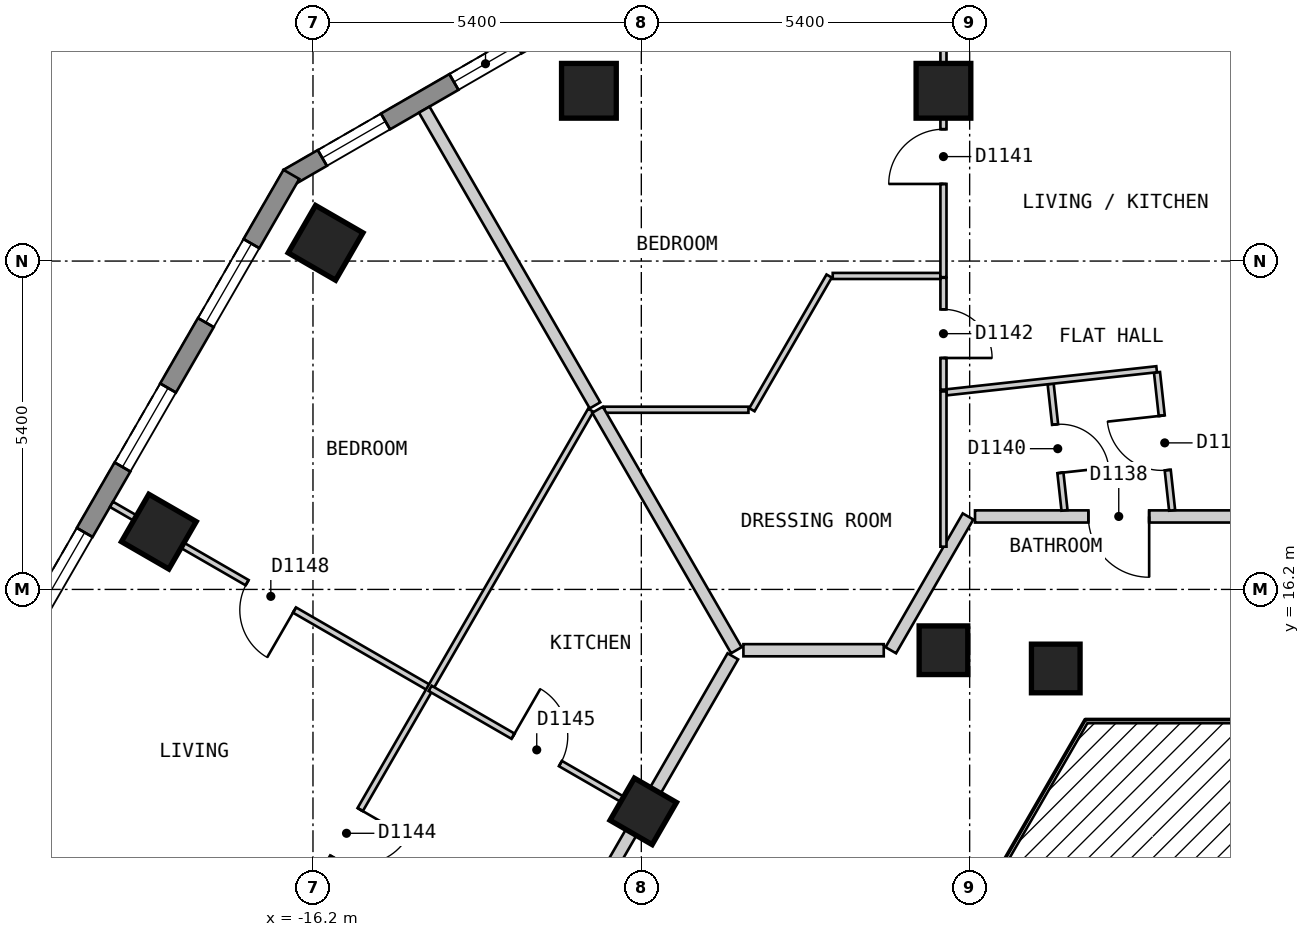
"""IFC4 building model, lengths in metres.
Left out: names, types, materials, properties, quantities, classifications, styles, units other than length and angle.
Written with IfcOpenShell. Run it as: python <this file> out.ifc"""

import sys

from ifc_helpers import new_model, si_unit, direction, frame, frame_2d, origin, origin_2d, place, context, subcontext, project, spatial, polyline, rectangle, outline, extrude, element, fill, save


model = new_model("IFC4")
c1 = context("Model", 3, precision=1e-05, world=origin(), true_north=direction((0.0, 1.0)))
c2 = subcontext(c1, "Body", "Model", "MODEL_VIEW")
j1 = project(units=[si_unit("LENGTHUNIT", "METRE"), si_unit("PLANEANGLEUNIT", "RADIAN")], contexts=[c1])
p1 = place(None, origin())
s1 = spatial("IfcSite", under=j1, at=p1, CompositionType="ELEMENT")
p2 = place(p1, origin())
s2 = spatial("IfcBuilding", under=s1, at=p2, CompositionType="ELEMENT")
p3 = place(p2, frame((0.0, 0.0, 150.6)))
s3 = spatial("IfcBuildingStorey", under=s2, at=p3, CompositionType="ELEMENT", Elevation=150.6)
for number, where, z_axis, x_axis in (
    (1, (-5.831, 24.4, 0.0), (0.0, 0.0, 1.0), (-1.0, 0.0, 0.0)),
    (2, (-11.662, 24.4, 0.0), (0.0, 0.0, 1.0), (-1.0, 0.0, 0.0)),
    (3, (-15.993, 21.9, 0.0), (0.0, 0.0, 1.0), (-0.5, -0.866, 0.0)),
    (4, (-18.735, 17.15, 0.0), (0.0, 0.0, 1.0), (-0.5, -0.866, 0.0)),
):
    element("IfcColumn", number, at=place(p3, frame(where, z_axis=z_axis, x_axis=x_axis)), inside=s3, PredefinedType="COLUMN", context=c2, shape_type="SweptSolid", body=[
        extrude(rectangle(XDim=0.9, YDim=0.9, at=origin_2d()), origin(), (0.0, 0.0, 1.0), 3.0),
    ])
for number, where, z_axis, x_axis in (
    (5, (-3.984, 14.9, 0.0), (0.0, 0.0, 1.0), (1.0, 0.0, 0.0)),
    (6, (-5.831, 15.2, 0.0), (0.0, 0.0, 1.0), (-1.0, 0.0, 0.0)),
    (7, (-10.768, 12.55, 0.0), (0.0, 0.0, 1.0), (-0.5, -0.866, 0.0)),
):
    element("IfcColumn", number, at=place(p3, frame(where, z_axis=z_axis, x_axis=x_axis)), inside=s3, PredefinedType="COLUMN", context=c2, shape_type="SweptSolid", body=[
        extrude(rectangle(XDim=0.8, YDim=0.8, at=origin_2d()), origin(), (0.0, 0.0, 1.0), 3.0),
    ])
p4 = place(p3, frame((-12.28, 25.47, 0.0), z_axis=(0.0, 0.0, 1.0), x_axis=(-0.866022959057, -0.500004234368, 0.0)))
e8 = element("IfcWall", 8, at=p4, inside=s3, PredefinedType="SOLIDWALL", context=c2, shape_type="SweptSolid", body=[
    extrude(outline(polyline([(0.0, -0.15), (5.0, -0.15), (4.92, 0.15), (0.08, 0.15), (0.0, -0.15)])), origin(), (0.0, 0.0, 1.0), 2.6),
])
p5 = place(p4, frame((0.65, 0.0, 0.15)))
e9 = element("IfcOpeningElement", 9, at=p5, cuts=e8, PredefinedType="OPENING", context=c2, shape_type="SweptSolid", body=[
    extrude(rectangle(XDim=1.2, YDim=2.1, at=frame_2d((0.6, 1.05))), frame((0.0, 0.16, 0.0), z_axis=(0.0, -1.0, 0.0), x_axis=(1.0, 0.0, 0.0)), (0.0, 0.0, 1.0), 0.32),
])
p6 = place(p4, frame((3.149, 0.0, 0.15)))
e10 = element("IfcOpeningElement", 10, at=p6, cuts=e8, PredefinedType="OPENING", context=c2, shape_type="SweptSolid", body=[
    extrude(rectangle(XDim=1.2, YDim=2.1, at=frame_2d((0.6, 1.05))), frame((0.0, 0.16, 0.0), z_axis=(0.0, -1.0, 0.0), x_axis=(1.0, 0.0, 0.0)), (0.0, 0.0, 1.0), 0.32),
])
p7 = place(p3, frame((-16.555, 23.025, 0.0), z_axis=(0.0, 0.0, 1.0), x_axis=(-0.500020536353, -0.866013546791, 0.0)))
e11 = element("IfcWall", 11, at=p7, inside=s3, PredefinedType="SOLIDWALL", context=c2, shape_type="SweptSolid", body=[
    extrude(outline(polyline([(0.0, -0.15), (23.325, -0.15), (23.245, 0.15), (0.08, 0.15), (0.0, -0.15)])), origin(), (0.0, 0.0, 1.0), 2.6),
])
p8 = place(p7, frame((1.314, 0.0, 0.15)))
e12 = element("IfcOpeningElement", 12, at=p8, cuts=e11, PredefinedType="OPENING", context=c2, shape_type="SweptSolid", body=[
    extrude(rectangle(XDim=1.5, YDim=2.1, at=frame_2d((0.75, 1.05))), frame((0.0, 0.16, 0.0), z_axis=(0.0, -1.0, 0.0), x_axis=(1.0, 0.0, 0.0)), (0.0, 0.0, 1.0), 0.32),
])
p9 = place(p7, frame((4.056, 0.0, 0.15)))
e13 = element("IfcOpeningElement", 13, at=p9, cuts=e11, PredefinedType="OPENING", context=c2, shape_type="SweptSolid", body=[
    extrude(rectangle(XDim=1.5, YDim=2.1, at=frame_2d((0.75, 1.05))), frame((0.0, 0.16, 0.0), z_axis=(0.0, -1.0, 0.0), x_axis=(1.0, 0.0, 0.0)), (0.0, 0.0, 1.0), 0.32),
])
p10 = place(p7, frame((6.799, 0.0, 0.15)))
e14 = element("IfcOpeningElement", 14, at=p10, cuts=e11, PredefinedType="OPENING", context=c2, shape_type="SweptSolid", body=[
    extrude(rectangle(XDim=1.5, YDim=2.1, at=frame_2d((0.75, 1.05))), frame((0.0, 0.16, 0.0), z_axis=(0.0, -1.0, 0.0), x_axis=(1.0, 0.0, 0.0)), (0.0, 0.0, 1.0), 0.32),
])
p11 = place(p7, frame((9.541, 0.0, 0.15)))
e15 = element("IfcOpeningElement", 15, at=p11, cuts=e11, PredefinedType="OPENING", context=c2, shape_type="SweptSolid", body=[
    extrude(rectangle(XDim=1.5, YDim=2.1, at=frame_2d((0.75, 1.05))), frame((0.0, 0.16, 0.0), z_axis=(0.0, -1.0, 0.0), x_axis=(1.0, 0.0, 0.0)), (0.0, 0.0, 1.0), 0.32),
])
p12 = place(p7, frame((12.285, 0.0, 0.15)))
e16 = element("IfcOpeningElement", 16, at=p12, cuts=e11, PredefinedType="OPENING", context=c2, shape_type="SweptSolid", body=[
    extrude(rectangle(XDim=1.5, YDim=2.1, at=frame_2d((0.75, 1.05))), frame((0.0, 0.16, 0.0), z_axis=(0.0, -1.0, 0.0), x_axis=(1.0, 0.0, 0.0)), (0.0, 0.0, 1.0), 0.32),
])
p13 = place(p7, frame((15.027, 0.0, 0.15)))
e17 = element("IfcOpeningElement", 17, at=p13, cuts=e11, PredefinedType="OPENING", context=c2, shape_type="SweptSolid", body=[
    extrude(rectangle(XDim=1.5, YDim=2.1, at=frame_2d((0.75, 1.05))), frame((0.0, 0.16, 0.0), z_axis=(0.0, -1.0, 0.0), x_axis=(1.0, 0.0, 0.0)), (0.0, 0.0, 1.0), 0.32),
])
p14 = place(p7, frame((17.769, 0.0, 0.15)))
e18 = element("IfcOpeningElement", 18, at=p14, cuts=e11, PredefinedType="OPENING", context=c2, shape_type="SweptSolid", body=[
    extrude(rectangle(XDim=1.5, YDim=2.1, at=frame_2d((0.75, 1.05))), frame((0.0, 0.16, 0.0), z_axis=(0.0, -1.0, 0.0), x_axis=(1.0, 0.0, 0.0)), (0.0, 0.0, 1.0), 0.32),
])
p15 = place(p7, frame((20.512, 0.0, 0.15)))
e19 = element("IfcOpeningElement", 19, at=p15, cuts=e11, PredefinedType="OPENING", context=c2, shape_type="SweptSolid", body=[
    extrude(rectangle(XDim=1.5, YDim=2.1, at=frame_2d((0.75, 1.05))), frame((0.0, 0.16, 0.0), z_axis=(0.0, -1.0, 0.0), x_axis=(1.0, 0.0, 0.0)), (0.0, 0.0, 1.0), 0.32),
])
p16 = place(p3, frame((-9.121, 15.2, 0.0), z_axis=(0.0, 0.0, 1.0), x_axis=(1.0, 0.0, 0.0)))
e20 = element("IfcWall", 20, at=p16, inside=s3, PredefinedType="PARTITIONING", context=c2, shape_type="SweptSolid", body=[
    extrude(rectangle(XDim=2.308, YDim=0.2, at=frame_2d((1.154, 0.0))), origin(), (0.0, 0.0, 1.0), 2.6),
])
p17 = place(p3, frame((-5.312, 17.4, 0.0), z_axis=(0.0, 0.0, 1.0), x_axis=(1.0, 0.0, 0.0)))
e21 = element("IfcWall", 21, at=p17, inside=s3, PredefinedType="PARTITIONING", context=c2, shape_type="SweptSolid", body=[
    extrude(rectangle(XDim=10.739, YDim=0.2, at=frame_2d((5.37, 0.0))), origin(), (0.0, 0.0, 1.0), 2.6),
])
p18 = place(p17, frame((7.538, 0.0, 0.0)))
e22 = element("IfcOpeningElement", 22, at=p18, cuts=e21, PredefinedType="OPENING", context=c2, shape_type="SweptSolid", body=[
    extrude(rectangle(XDim=1.0, YDim=2.1, at=frame_2d((0.5, 1.05))), frame((0.0, 0.11, 0.0), z_axis=(0.0, -1.0, 0.0), x_axis=(1.0, 0.0, 0.0)), (0.0, 0.0, 1.0), 0.22),
])
p19 = place(p17, frame((1.864, 0.0, 0.0)))
e23 = element("IfcOpeningElement", 23, at=p19, cuts=e21, PredefinedType="OPENING", context=c2, shape_type="SweptSolid", body=[
    extrude(rectangle(XDim=1.0, YDim=2.1, at=frame_2d((0.5, 1.05))), frame((0.0, 0.11, 0.0), z_axis=(0.0, -1.0, 0.0), x_axis=(1.0, 0.0, 0.0)), (0.0, 0.0, 1.0), 0.22),
])
p20 = place(p3, frame((-6.697, 15.2, 0.0), z_axis=(0.0, 0.0, 1.0), x_axis=(0.499963722229, 0.866046347752, 0.0)))
e24 = element("IfcWall", 24, at=p20, inside=s3, PredefinedType="PARTITIONING", context=c2, shape_type="SweptSolid", body=[
    extrude(rectangle(XDim=2.54, YDim=0.2, at=frame_2d((1.27, 0.0))), origin(), (0.0, 0.0, 1.0), 2.6),
])
p21 = place(p3, frame((-17.724, 0.5, 0.0), z_axis=(0.0, 0.0, 1.0), x_axis=(0.499992388462, 0.866029798263, 0.0)))
e25 = element("IfcWall", 25, at=p21, inside=s3, PredefinedType="PARTITIONING", context=c2, shape_type="SweptSolid", body=[
    extrude(rectangle(XDim=16.859, YDim=0.2, at=frame_2d((8.429, 0.0))), origin(), (0.0, 0.0, 1.0), 2.6),
])
p22 = place(p21, frame((10.672, 0.0, 0.0)))
e26 = element("IfcOpeningElement", 26, at=p22, cuts=e25, PredefinedType="OPENING", context=c2, shape_type="SweptSolid", body=[
    extrude(rectangle(XDim=1.0, YDim=2.1, at=frame_2d((0.5, 1.05))), frame((0.0, 0.11, 0.0), z_axis=(0.0, -1.0, 0.0), x_axis=(1.0, 0.0, 0.0)), (0.0, 0.0, 1.0), 0.22),
])
p23 = place(p3, frame((-2.319, 19.77, 0.0), z_axis=(0.0, 0.0, 1.0), x_axis=(0.109046821538, -0.994036614372, 0.0)))
e27 = element("IfcWall", 27, at=p23, inside=s3, PredefinedType="PARTITIONING", context=c2, shape_type="SweptSolid", body=[
    extrude(rectangle(XDim=2.284, YDim=0.1, at=frame_2d((1.142, 0.0))), origin(), (0.0, 0.0, 1.0), 2.6),
])
p24 = place(p23, frame((0.717, 0.0, 0.0)))
e28 = element("IfcOpeningElement", 28, at=p24, cuts=e27, PredefinedType="OPENING", context=c2, shape_type="SweptSolid", body=[
    extrude(rectangle(XDim=0.9, YDim=2.1, at=frame_2d((0.45, 1.05))), frame((0.0, 0.06, 0.0), z_axis=(0.0, -1.0, 0.0), x_axis=(1.0, 0.0, 0.0)), (0.0, 0.0, 1.0), 0.12),
])
p25 = place(p3, frame((-4.068, 19.579, 0.0), z_axis=(0.0, 0.0, 1.0), x_axis=(0.109022161139, -0.994039319333, 0.0)))
e29 = element("IfcWall", 29, at=p25, inside=s3, PredefinedType="PARTITIONING", context=c2, shape_type="SweptSolid", body=[
    extrude(rectangle(XDim=2.092, YDim=0.1, at=frame_2d((1.046, 0.0))), origin(), (0.0, 0.0, 1.0), 2.6),
])
p26 = place(p25, frame((0.671, 0.0, 0.0)))
e30 = element("IfcOpeningElement", 30, at=p26, cuts=e29, PredefinedType="OPENING", context=c2, shape_type="SweptSolid", body=[
    extrude(rectangle(XDim=0.8, YDim=2.1, at=frame_2d((0.4, 1.05))), frame((0.0, 0.06, 0.0), z_axis=(0.0, -1.0, 0.0), x_axis=(1.0, 0.0, 0.0)), (0.0, 0.0, 1.0), 0.12),
])
p27 = place(p3, frame((-5.831, 21.325, 0.0), z_axis=(0.0, 0.0, 1.0), x_axis=(0.0, -1.0, 0.0)))
e31 = element("IfcWall", 31, at=p27, inside=s3, PredefinedType="PARTITIONING", context=c2, shape_type="SweptSolid", body=[
    extrude(rectangle(XDim=1.839, YDim=0.1, at=frame_2d((0.919, 0.0))), origin(), (0.0, 0.0, 1.0), 2.6),
])
p28 = place(p27, frame((0.519, 0.0, 0.0)))
e32 = element("IfcOpeningElement", 32, at=p28, cuts=e31, PredefinedType="OPENING", context=c2, shape_type="SweptSolid", body=[
    extrude(rectangle(XDim=0.8, YDim=2.1, at=frame_2d((0.4, 1.05))), frame((0.0, 0.06, 0.0), z_axis=(0.0, -1.0, 0.0), x_axis=(1.0, 0.0, 0.0)), (0.0, 0.0, 1.0), 0.12),
])
p29 = place(p3, frame((-19.514, 17.599, 0.0), z_axis=(0.0, 0.0, 1.0), x_axis=(0.866007554612, -0.500030914399, 0.0)))
e33 = element("IfcWall", 33, at=p29, inside=s3, PredefinedType="PARTITIONING", context=c2, shape_type="SweptSolid", body=[
    extrude(rectangle(XDim=6.052, YDim=0.1, at=frame_2d((3.026, 0.0))), origin(), (0.0, 0.0, 1.0), 2.6),
])
p30 = place(p29, frame((2.576, 0.0, 0.0)))
e34 = element("IfcOpeningElement", 34, at=p30, cuts=e33, PredefinedType="OPENING", context=c2, shape_type="SweptSolid", body=[
    extrude(rectangle(XDim=0.9, YDim=2.1, at=frame_2d((0.45, 1.05))), frame((0.0, 0.06, 0.0), z_axis=(0.0, -1.0, 0.0), x_axis=(1.0, 0.0, 0.0)), (0.0, 0.0, 1.0), 0.12),
])
p31 = place(p3, frame((-11.405, 19.155, 0.0), z_axis=(0.0, 0.0, 1.0), x_axis=(1.0, 0.0, 0.0)))
e35 = element("IfcWall", 35, at=p31, inside=s3, PredefinedType="PARTITIONING", context=c2, shape_type="SweptSolid", body=[
    extrude(rectangle(XDim=2.367, YDim=0.1, at=frame_2d((1.184, 0.0))), origin(), (0.0, 0.0, 1.0), 2.6),
])
p32 = place(p3, frame((-7.652, 21.355, 0.0), z_axis=(0.0, 0.0, 1.0), x_axis=(1.0, 0.0, 0.0)))
e36 = element("IfcWall", 36, at=p32, inside=s3, PredefinedType="PARTITIONING", context=c2, shape_type="SweptSolid", body=[
    extrude(rectangle(XDim=1.771, YDim=0.1, at=frame_2d((0.885, 0.0))), origin(), (0.0, 0.0, 1.0), 2.6),
])
p33 = place(p3, frame((-8.981, 19.155, 0.0), z_axis=(0.0, 0.0, 1.0), x_axis=(0.500130227609, 0.865950203783, 0.0)))
e37 = element("IfcWall", 37, at=p33, inside=s3, PredefinedType="PARTITIONING", context=c2, shape_type="SweptSolid", body=[
    extrude(rectangle(XDim=2.539, YDim=0.1, at=frame_2d((1.27, 0.0))), origin(), (0.0, 0.0, 1.0), 2.6),
])
p34 = place(p3, frame((-22.398, 0.499, 0.0), z_axis=(0.0, 0.0, 1.0), x_axis=(0.499981561717, 0.866036048871, 0.0)))
e38 = element("IfcWall", 38, at=p34, inside=s3, PredefinedType="PARTITIONING", context=c2, shape_type="SweptSolid", body=[
    extrude(rectangle(XDim=21.532, YDim=0.1, at=frame_2d((10.766, 0.0))), origin(), (0.0, 0.0, 1.0), 2.6),
])
p35 = place(p34, frame((13.049, 0.0, 0.0)))
e39 = element("IfcOpeningElement", 39, at=p35, cuts=e38, PredefinedType="OPENING", context=c2, shape_type="SweptSolid", body=[
    extrude(rectangle(XDim=0.9, YDim=2.1, at=frame_2d((0.45, 1.05))), frame((0.0, 0.06, 0.0), z_axis=(0.0, -1.0, 0.0), x_axis=(1.0, 0.0, 0.0)), (0.0, 0.0, 1.0), 0.12),
])
p36 = place(p34, frame((2.183, 0.0, 0.0)))
e40 = element("IfcOpeningElement", 40, at=p36, cuts=e38, PredefinedType="OPENING", context=c2, shape_type="SweptSolid", body=[
    extrude(rectangle(XDim=0.8, YDim=2.1, at=frame_2d((0.4, 1.05))), frame((0.0, 0.06, 0.0), z_axis=(0.0, -1.0, 0.0), x_axis=(1.0, 0.0, 0.0)), (0.0, 0.0, 1.0), 0.12),
])
p37 = place(p3, frame((-5.781, 19.441, 0.0), z_axis=(0.0, 0.0, 1.0), x_axis=(0.994005576935, 0.109329378588, 0.0)))
e41 = element("IfcWall", 41, at=p37, inside=s3, PredefinedType="PARTITIONING", context=c2, shape_type="SweptSolid", body=[
    extrude(rectangle(XDim=3.477, YDim=0.1, at=frame_2d((1.738, 0.0))), origin(), (0.0, 0.0, 1.0), 2.6),
])
p38 = place(p3, frame((-5.831, 16.903, 0.0), z_axis=(0.0, 0.0, 1.0), x_axis=(0.0, 1.0, 0.0)))
e42 = element("IfcWall", 42, at=p38, inside=s3, PredefinedType="PARTITIONING", context=c2, shape_type="SweptSolid", body=[
    extrude(rectangle(XDim=2.553, YDim=0.1, at=frame_2d((1.276, 0.0))), origin(), (0.0, 0.0, 1.0), 2.6),
])
p39 = place(p3, frame((-5.831, 21.335, 0.0), z_axis=(0.0, 0.0, 1.0), x_axis=(0.0, 1.0, 0.0)))
e43 = element("IfcWall", 43, at=p39, inside=s3, PredefinedType="PARTITIONING", context=c2, shape_type="SweptSolid", body=[
    extrude(rectangle(XDim=3.965, YDim=0.1, at=frame_2d((1.982, 0.0))), origin(), (0.0, 0.0, 1.0), 2.6),
])
p40 = place(p39, frame((1.533, 0.0, 0.0)))
e44 = element("IfcOpeningElement", 44, at=p40, cuts=e43, PredefinedType="OPENING", context=c2, shape_type="SweptSolid", body=[
    extrude(rectangle(XDim=0.9, YDim=2.1, at=frame_2d((0.45, 1.05))), frame((0.0, 0.06, 0.0), z_axis=(0.0, -1.0, 0.0), x_axis=(1.0, 0.0, 0.0)), (0.0, 0.0, 1.0), 0.12),
])
p41 = place(p3, frame((-14.37, 24.09, 0.0), z_axis=(0.0, 0.0, 1.0), x_axis=(0.500057386422, -0.865992269183, 0.0)))
e45 = element("IfcWall", 45, at=p41, inside=s3, PredefinedType="PARTITIONING", context=c2, shape_type="SweptSolid", body=[
    extrude(rectangle(XDim=5.615, YDim=0.2, at=frame_2d((2.808, 0.0))), origin(), (0.0, 0.0, 1.0), 2.6),
])
p42 = place(p3, frame((-11.52, 19.155, 0.0), z_axis=(0.0, 0.0, 1.0), x_axis=(0.499916824138, -0.866073420066, 0.0)))
e46 = element("IfcWall", 46, at=p42, inside=s3, PredefinedType="PARTITIONING", context=c2, shape_type="SweptSolid", body=[
    extrude(rectangle(XDim=4.567, YDim=0.2, at=frame_2d((2.283, 0.0))), origin(), (0.0, 0.0, 1.0), 2.6),
])
p43 = place(p3, frame((-14.273, 14.573, 0.0), z_axis=(0.0, 0.0, 1.0), x_axis=(0.866138216955, -0.499804550929, 0.0)))
e47 = element("IfcWall", 47, at=p43, inside=s3, PredefinedType="PARTITIONING", context=c2, shape_type="SweptSolid", body=[
    extrude(rectangle(XDim=3.947, YDim=0.1, at=frame_2d((1.974, 0.0))), origin(), (0.0, 0.0, 1.0), 2.6),
])
p44 = place(p43, frame((1.574, 0.0, 0.0)))
e48 = element("IfcOpeningElement", 48, at=p44, cuts=e47, PredefinedType="OPENING", context=c2, shape_type="SweptSolid", body=[
    extrude(rectangle(XDim=0.9, YDim=2.1, at=frame_2d((0.45, 1.05))), frame((0.0, 0.06, 0.0), z_axis=(0.0, -1.0, 0.0), x_axis=(1.0, 0.0, 0.0)), (0.0, 0.0, 1.0), 0.12),
])
p45 = place(p5, origin())
e49 = element("IfcWindow", 49, at=p45, inside=s3, PartitioningType="SINGLE_PANEL", PredefinedType="WINDOW", context=c2, shape_type="SweptSolid", body=[
    extrude(rectangle(XDim=1.2, YDim=2.1, at=frame_2d((0.6, 1.05))), frame((0.0, 0.03, 0.0), z_axis=(0.0, -1.0, 0.0), x_axis=(1.0, 0.0, 0.0)), (0.0, 0.0, 1.0), 0.06),
])
fill(e9, e49)
p46 = place(p6, origin())
e50 = element("IfcWindow", 50, at=p46, inside=s3, PartitioningType="SINGLE_PANEL", PredefinedType="WINDOW", context=c2, shape_type="SweptSolid", body=[
    extrude(rectangle(XDim=1.2, YDim=2.1, at=frame_2d((0.6, 1.05))), frame((0.0, 0.03, 0.0), z_axis=(0.0, -1.0, 0.0), x_axis=(1.0, 0.0, 0.0)), (0.0, 0.0, 1.0), 0.06),
])
fill(e10, e50)
p47 = place(p8, origin())
e51 = element("IfcWindow", 51, at=p47, inside=s3, PartitioningType="SINGLE_PANEL", PredefinedType="WINDOW", context=c2, shape_type="SweptSolid", body=[
    extrude(rectangle(XDim=1.5, YDim=2.1, at=frame_2d((0.75, 1.05))), frame((0.0, 0.03, 0.0), z_axis=(0.0, -1.0, 0.0), x_axis=(1.0, 0.0, 0.0)), (0.0, 0.0, 1.0), 0.06),
])
fill(e12, e51)
p48 = place(p9, origin())
e52 = element("IfcWindow", 52, at=p48, inside=s3, PartitioningType="SINGLE_PANEL", PredefinedType="WINDOW", context=c2, shape_type="SweptSolid", body=[
    extrude(rectangle(XDim=1.5, YDim=2.1, at=frame_2d((0.75, 1.05))), frame((0.0, 0.03, 0.0), z_axis=(0.0, -1.0, 0.0), x_axis=(1.0, 0.0, 0.0)), (0.0, 0.0, 1.0), 0.06),
])
fill(e13, e52)
p49 = place(p10, origin())
e53 = element("IfcWindow", 53, at=p49, inside=s3, PartitioningType="SINGLE_PANEL", PredefinedType="WINDOW", context=c2, shape_type="SweptSolid", body=[
    extrude(rectangle(XDim=1.5, YDim=2.1, at=frame_2d((0.75, 1.05))), frame((0.0, 0.03, 0.0), z_axis=(0.0, -1.0, 0.0), x_axis=(1.0, 0.0, 0.0)), (0.0, 0.0, 1.0), 0.06),
])
fill(e14, e53)
p50 = place(p19, origin())
e54 = element("IfcDoor", 54, at=p50, inside=s3, OperationType="SINGLE_SWING_RIGHT", PredefinedType="DOOR", context=c2, shape_type="SweptSolid", body=[
    extrude(rectangle(XDim=1.0, YDim=2.1, at=frame_2d((0.5, 1.05))), frame((0.0, 0.025, 0.0), z_axis=(0.0, -1.0, 0.0), x_axis=(1.0, 0.0, 0.0)), (0.0, 0.0, 1.0), 0.05),
])
fill(e23, e54)
p51 = place(p24, origin())
e55 = element("IfcDoor", 55, at=p51, inside=s3, OperationType="SINGLE_SWING_LEFT", PredefinedType="DOOR", context=c2, shape_type="SweptSolid", body=[
    extrude(rectangle(XDim=0.9, YDim=2.1, at=frame_2d((0.45, 1.05))), frame((0.0, 0.025, 0.0), z_axis=(0.0, -1.0, 0.0), x_axis=(1.0, 0.0, 0.0)), (0.0, 0.0, 1.0), 0.05),
])
fill(e28, e55)
p52 = place(p26, origin())
e56 = element("IfcDoor", 56, at=p52, inside=s3, OperationType="SINGLE_SWING_RIGHT", PredefinedType="DOOR", context=c2, shape_type="SweptSolid", body=[
    extrude(rectangle(XDim=0.8, YDim=2.1, at=frame_2d((0.4, 1.05))), frame((0.0, 0.025, 0.0), z_axis=(0.0, -1.0, 0.0), x_axis=(1.0, 0.0, 0.0)), (0.0, 0.0, 1.0), 0.05),
])
fill(e30, e56)
p53 = place(p40, origin())
e57 = element("IfcDoor", 57, at=p53, inside=s3, OperationType="SINGLE_SWING_LEFT", PredefinedType="DOOR", context=c2, shape_type="SweptSolid", body=[
    extrude(rectangle(XDim=0.9, YDim=2.1, at=frame_2d((0.45, 1.05))), frame((0.0, 0.025, 0.0), z_axis=(0.0, -1.0, 0.0), x_axis=(1.0, 0.0, 0.0)), (0.0, 0.0, 1.0), 0.05),
])
fill(e44, e57)
p54 = place(p28, origin())
e58 = element("IfcDoor", 58, at=p54, inside=s3, OperationType="SINGLE_SWING_RIGHT", PredefinedType="DOOR", context=c2, shape_type="SweptSolid", body=[
    extrude(rectangle(XDim=0.8, YDim=2.1, at=frame_2d((0.4, 1.05))), frame((0.0, 0.025, 0.0), z_axis=(0.0, -1.0, 0.0), x_axis=(1.0, 0.0, 0.0)), (0.0, 0.0, 1.0), 0.05),
])
fill(e32, e58)
p55 = place(p35, origin())
e59 = element("IfcDoor", 59, at=p55, inside=s3, OperationType="SINGLE_SWING_RIGHT", PredefinedType="DOOR", context=c2, shape_type="SweptSolid", body=[
    extrude(rectangle(XDim=0.9, YDim=2.1, at=frame_2d((0.45, 1.05))), frame((0.0, 0.025, 0.0), z_axis=(0.0, -1.0, 0.0), x_axis=(1.0, 0.0, 0.0)), (0.0, 0.0, 1.0), 0.05),
])
fill(e39, e59)
p56 = place(p44, origin())
e60 = element("IfcDoor", 60, at=p56, inside=s3, OperationType="SINGLE_SWING_LEFT", PredefinedType="DOOR", context=c2, shape_type="SweptSolid", body=[
    extrude(rectangle(XDim=0.9, YDim=2.1, at=frame_2d((0.45, 1.05))), frame((0.0, 0.025, 0.0), z_axis=(0.0, -1.0, 0.0), x_axis=(1.0, 0.0, 0.0)), (0.0, 0.0, 1.0), 0.05),
])
fill(e48, e60)
p57 = place(p30, origin())
e61 = element("IfcDoor", 61, at=p57, inside=s3, OperationType="SINGLE_SWING_RIGHT", PredefinedType="DOOR", context=c2, shape_type="SweptSolid", body=[
    extrude(rectangle(XDim=0.9, YDim=2.1, at=frame_2d((0.45, 1.05))), frame((0.0, 0.025, 0.0), z_axis=(0.0, -1.0, 0.0), x_axis=(1.0, 0.0, 0.0)), (0.0, 0.0, 1.0), 0.05),
])
fill(e34, e61)
save(model, sys.argv[1])
